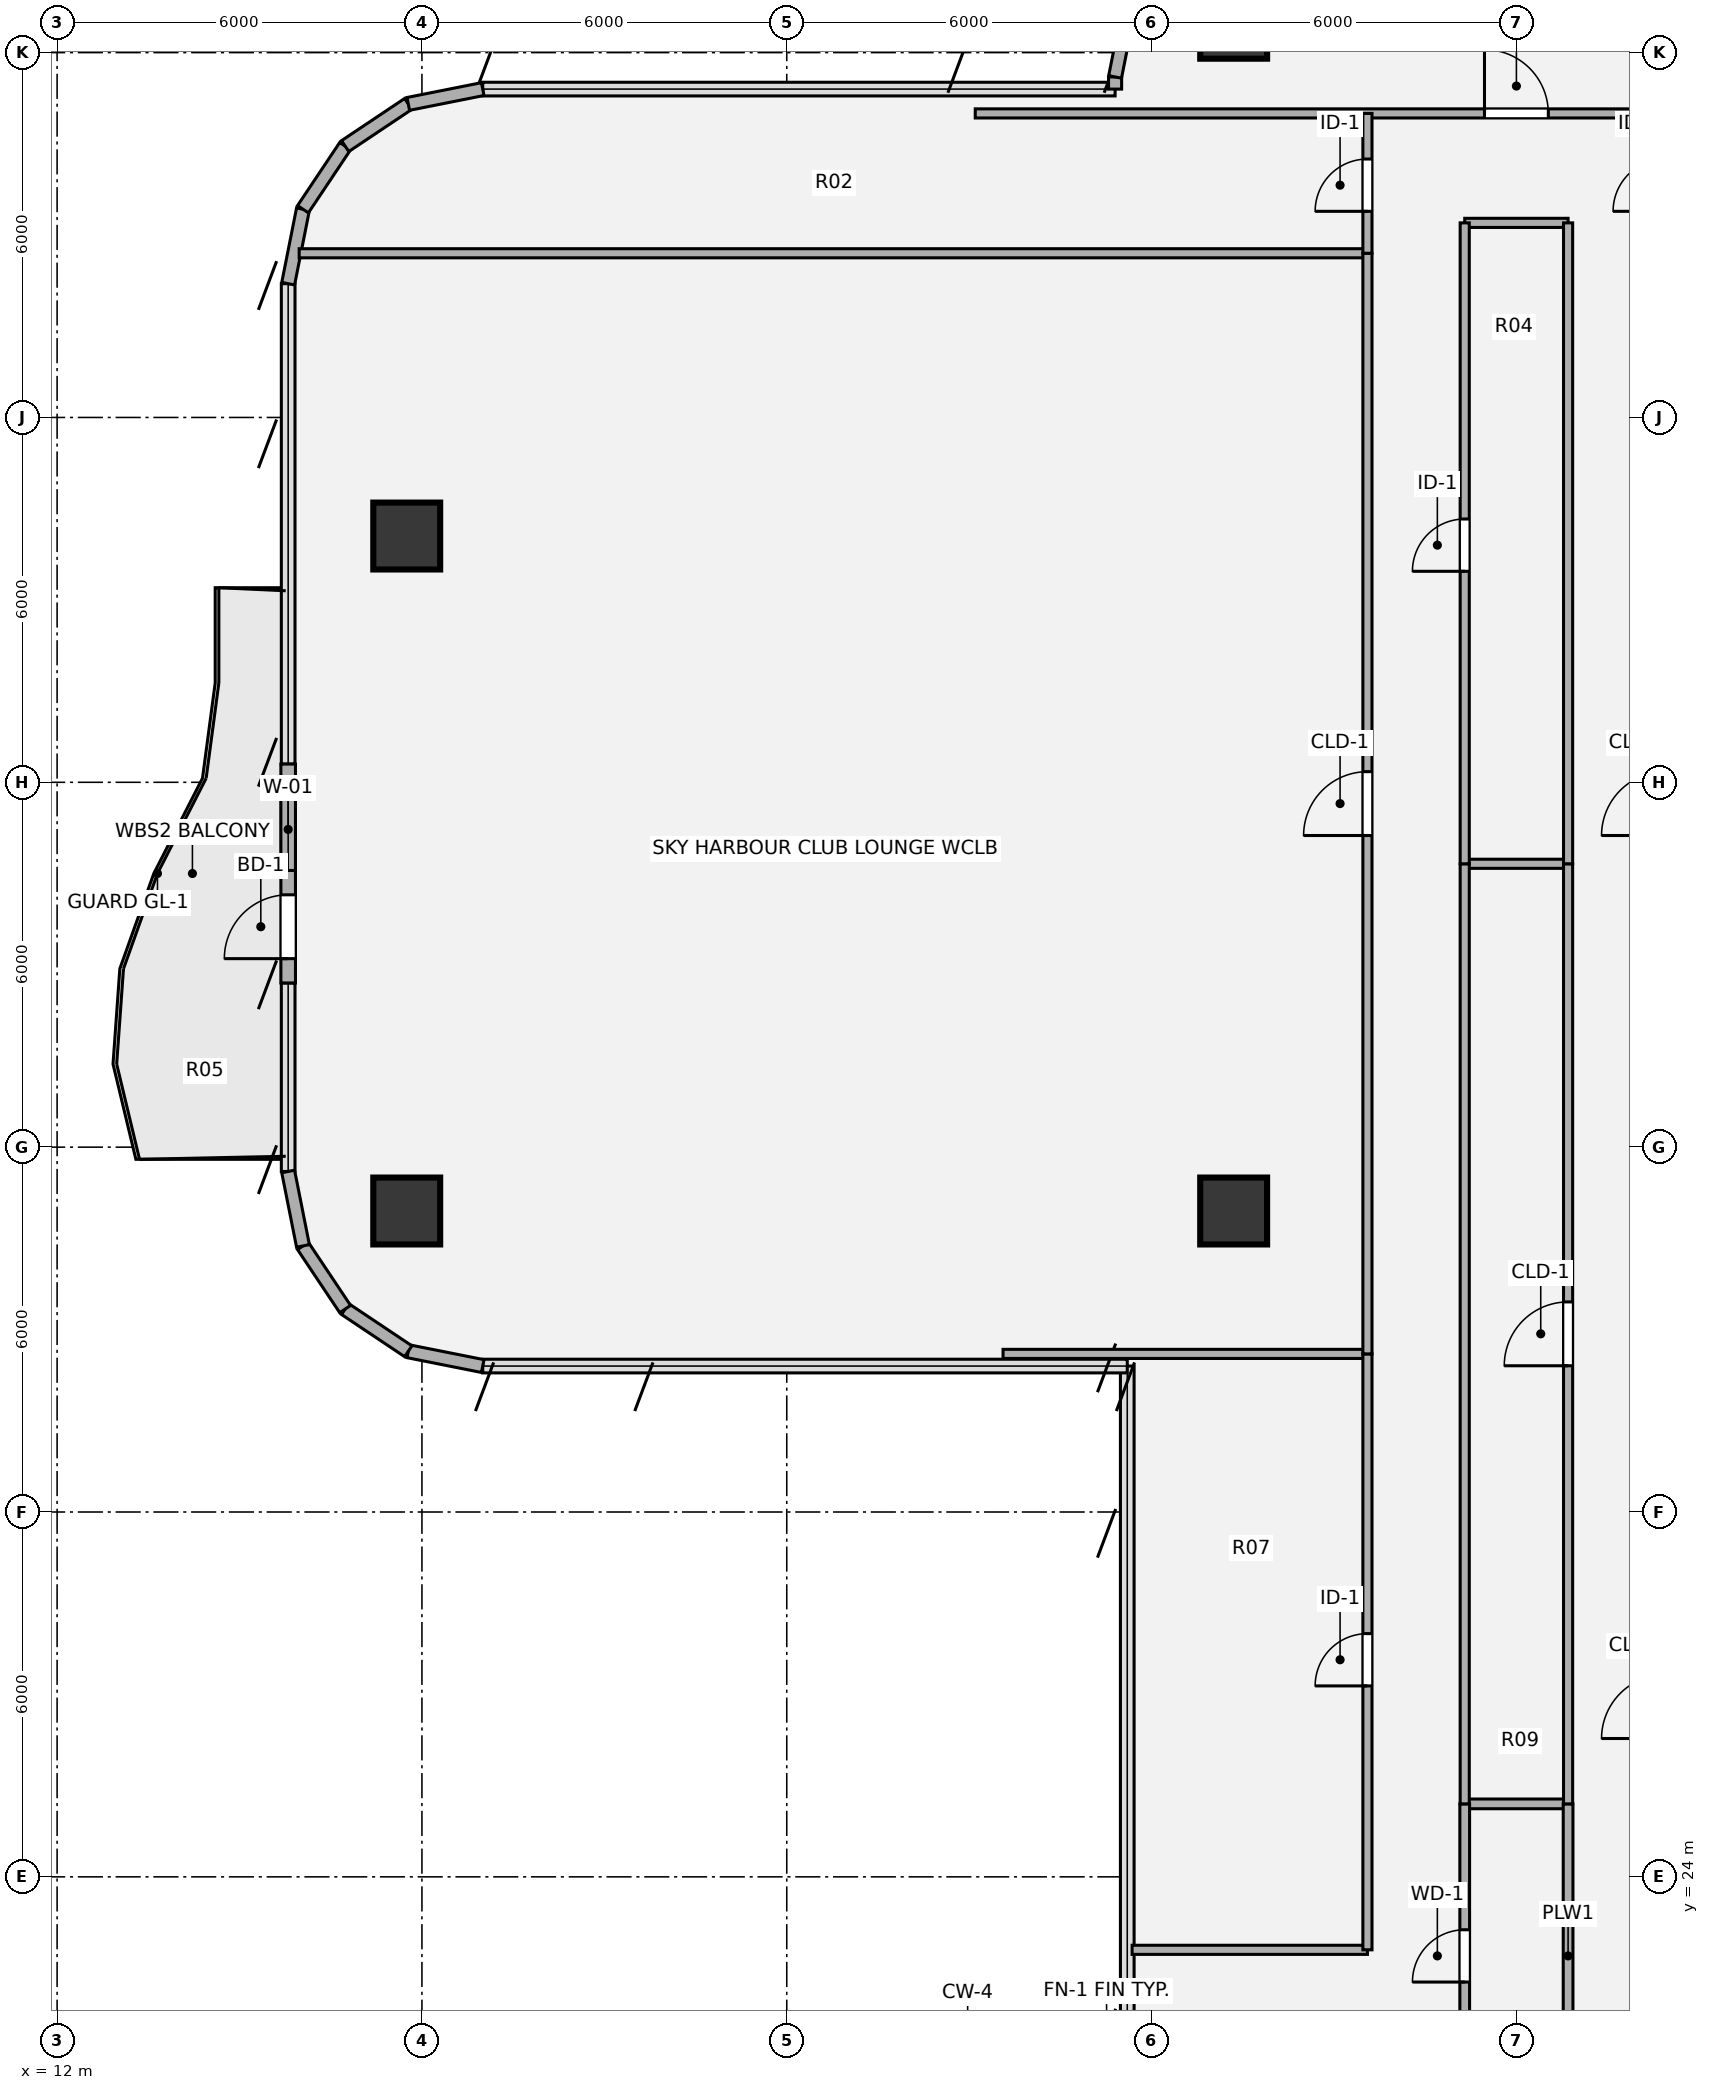
"""IFC4 building model, lengths in metres.
Left out: names, types, materials, properties, quantities, classifications, styles, units other than length and angle.
Written with IfcOpenShell. Run it as: python <this file> out.ifc"""

import sys

from ifc_helpers import new_model, si_unit, direction, frame, frame_2d, origin, origin_2d, place, context, subcontext, project, spatial, rectangle, hollow_circle, extrude, source, transform, mapped, element, fill, save


model = new_model("IFC4")
c1 = context("Model", 3, precision=1e-05, world=origin(), true_north=direction((0.0, 1.0)))
c2 = subcontext(c1, "Body", "Model", "MODEL_VIEW")
j1 = project(units=[si_unit("LENGTHUNIT", "METRE"), si_unit("PLANEANGLEUNIT", "RADIAN")], contexts=[c1])
p1 = place(None, origin())
s1 = spatial("IfcSite", under=j1, at=p1, CompositionType="ELEMENT")
p2 = place(p1, origin())
s2 = spatial("IfcBuilding", under=s1, at=p2, CompositionType="ELEMENT")
p3 = place(p2, frame((0.0, 0.0, 186.66)))
s3 = spatial("IfcBuildingStorey", under=s2, at=p3, CompositionType="ELEMENT", Elevation=186.66)
m1 = source(origin(), c2, "Body", "SweptSolid", [
    extrude(hollow_circle(Radius=0.55, WallThickness=0.04, at=origin_2d()), origin(), (0.0, 0.0, 1.0), 3.78),
])
for number, where, z_axis, x_axis in (
    (1, (17.75, 34.95, 0.0), (0.0, 0.0, 1.0), (1.0, 0.0, 0.0)),
    (2, (17.75, 46.05, 0.0), (0.0, 0.0, 1.0), (1.0, 0.0, 0.0)),
    (3, (31.35, 34.95, 0.0), (0.0, 0.0, 1.0), (1.0, 0.0, 0.0)),
    (4, (31.35, 54.45, 0.0), (0.0, 0.0, 1.0), (1.0, 0.0, 0.0)),
):
    element("IfcColumn", number, at=place(p3, frame(where, z_axis=z_axis, x_axis=x_axis)), inside=s3, PredefinedType="COLUMN", context=c2, shape_type="MappedRepresentation", body=[
        mapped(m1, transform((0.0, 0.0, 0.0), x_axis=(1.0, 0.0, 0.0), y_axis=(0.0, 1.0, 0.0), z_axis=(0.0, 0.0, 1.0), scale=1.0)),
    ])
for number, where, z_axis, x_axis in (
    (5, (19.0, 32.4, 0.0), (0.0, 0.0, 1.0), (-0.981, 0.195, 0.0)),
    (6, (17.775, 32.644, 0.0), (0.0, 0.0, 1.0), (-0.831, 0.556, 0.0)),
    (7, (16.737, 33.337, 0.0), (0.0, 0.0, 1.0), (-0.556, 0.831, 0.0)),
    (8, (16.044, 34.375, 0.0), (0.0, 0.0, 1.0), (-0.195, 0.981, 0.0)),
):
    element("IfcWall", number, at=place(p3, frame(where, z_axis=z_axis, x_axis=x_axis)), inside=s3, PredefinedType="SOLIDWALL", context=c2, shape_type="SweptSolid", body=[
        extrude(rectangle(XDim=1.249, YDim=0.215, at=frame_2d((0.624, 0.0))), origin(), (0.0, 0.0, 1.0), 3.53),
    ])
p4 = place(p3, frame((15.8, 38.7, 0.0), z_axis=(0.0, 0.0, 1.0), x_axis=(0.0, 1.0, 0.0)))
e9 = element("IfcWall", 9, at=p4, inside=s3, PredefinedType="SOLIDWALL", context=c2, shape_type="SweptSolid", body=[
    extrude(rectangle(XDim=3.6, YDim=0.24, at=frame_2d((1.8, 0.0))), origin(), (0.0, 0.0, 1.0), 3.53),
])
p5 = place(p4, frame((0.4, 0.0, 0.0)))
e10 = element("IfcOpeningElement", 10, at=p5, cuts=e9, PredefinedType="OPENING", context=c2, shape_type="SweptSolid", body=[
    extrude(rectangle(XDim=1.05, YDim=2.15, at=origin_2d()), frame((0.525, 0.13, 1.075), z_axis=(0.0, -1.0, 0.0), x_axis=(1.0, 0.0, 0.0)), (0.0, 0.0, 1.0), 0.26),
])
p6 = place(p4, frame((1.85, 0.0, 0.85)))
e11 = element("IfcOpeningElement", 11, at=p6, cuts=e9, PredefinedType="OPENING", context=c2, shape_type="SweptSolid", body=[
    extrude(rectangle(XDim=1.35, YDim=1.35, at=origin_2d()), frame((0.675, 0.13, 0.675), z_axis=(0.0, -1.0, 0.0), x_axis=(1.0, 0.0, 0.0)), (0.0, 0.0, 1.0), 0.26),
])
for number, where, z_axis, x_axis in (
    (12, (15.8, 50.2, 0.0), (0.0, 0.0, 1.0), (0.195, 0.981, 0.0)),
    (13, (16.044, 51.425, 0.0), (0.0, 0.0, 1.0), (0.556, 0.831, 0.0)),
    (14, (16.737, 52.463, 0.0), (0.0, 0.0, 1.0), (0.831, 0.556, 0.0)),
    (15, (17.775, 53.156, 0.0), (0.0, 0.0, 1.0), (0.981, 0.195, 0.0)),
):
    element("IfcWall", number, at=place(p3, frame(where, z_axis=z_axis, x_axis=x_axis)), inside=s3, PredefinedType="SOLIDWALL", context=c2, shape_type="SweptSolid", body=[
        extrude(rectangle(XDim=1.249, YDim=0.215, at=frame_2d((0.624, 0.0))), origin(), (0.0, 0.0, 1.0), 3.53),
    ])
p7 = place(p3, frame((29.4, 53.4, 0.0), z_axis=(0.0, 0.0, 1.0), x_axis=(0.0, 1.0, 0.0)))
e16 = element("IfcWall", 16, at=p7, inside=s3, PredefinedType="SOLIDWALL", context=c2, shape_type="SweptSolid", body=[
    extrude(rectangle(XDim=0.2, YDim=0.215, at=frame_2d((0.1, 0.0))), origin(), (0.0, 0.0, 1.0), 3.53),
])
p8 = place(p3, frame((29.4, 53.6, 0.0), z_axis=(0.0, 0.0, 1.0), x_axis=(0.195127417394, 0.980777900945, 0.0)))
e17 = element("IfcWall", 17, at=p8, inside=s3, PredefinedType="SOLIDWALL", context=c2, shape_type="SweptSolid", body=[
    extrude(rectangle(XDim=1.092, YDim=0.215, at=frame_2d((0.546, 0.0))), origin(), (0.0, 0.0, 1.0), 3.53),
])
p9 = place(p3, frame((29.68, 22.8, 0.0), z_axis=(0.0, 0.0, 1.0), x_axis=(1.0, 0.0, 0.0)))
e18 = element("IfcWall", 18, at=p9, inside=s3, PredefinedType="PARTITIONING", context=c2, shape_type="SweptSolid", body=[
    extrude(rectangle(XDim=3.87, YDim=0.15, at=frame_2d((1.935, 0.0))), origin(), (0.0, 0.0, 1.0), 3.5),
])
p10 = place(p3, frame((35.15, 25.2, 0.0), z_axis=(0.0, 0.0, 1.0), x_axis=(1.0, 0.0, 0.0)))
e19 = element("IfcWall", 19, at=p10, inside=s3, PredefinedType="PLUMBINGWALL", context=c2, shape_type="SweptSolid", body=[
    extrude(rectangle(XDim=1.7, YDim=0.16, at=frame_2d((0.85, 0.0))), origin(), (0.0, 0.0, 1.0), 3.5),
])
p11 = place(p3, frame((27.557, 32.6, 0.0), z_axis=(0.0, 0.0, 1.0), x_axis=(1.0, 0.0, 0.0)))
e20 = element("IfcWall", 20, at=p11, inside=s3, PredefinedType="PARTITIONING", context=c2, shape_type="SweptSolid", body=[
    extrude(rectangle(XDim=5.993, YDim=0.15, at=frame_2d((2.997, 0.0))), origin(), (0.0, 0.0, 1.0), 3.5),
])
p12 = place(p3, frame((35.15, 40.66, 0.0), z_axis=(0.0, 0.0, 1.0), x_axis=(1.0, 0.0, 0.0)))
e21 = element("IfcWall", 21, at=p12, inside=s3, PredefinedType="PARTITIONING", context=c2, shape_type="SweptSolid", body=[
    extrude(rectangle(XDim=1.7, YDim=0.15, at=frame_2d((0.85, 0.0))), origin(), (0.0, 0.0, 1.0), 3.259),
])
p13 = place(p3, frame((15.981, 50.7, 0.0), z_axis=(0.0, 0.0, 1.0), x_axis=(1.0, 0.0, 0.0)))
e22 = element("IfcWall", 22, at=p13, inside=s3, PredefinedType="PARTITIONING", context=c2, shape_type="SweptSolid", body=[
    extrude(rectangle(XDim=17.569, YDim=0.15, at=frame_2d((8.785, 0.0))), origin(), (0.0, 0.0, 1.0), 3.308),
])
p14 = place(p3, frame((35.15, 51.2, 0.0), z_axis=(0.0, 0.0, 1.0), x_axis=(1.0, 0.0, 0.0)))
e23 = element("IfcWall", 23, at=p14, inside=s3, PredefinedType="PARTITIONING", context=c2, shape_type="SweptSolid", body=[
    extrude(rectangle(XDim=1.7, YDim=0.15, at=frame_2d((0.85, 0.0))), origin(), (0.0, 0.0, 1.0), 3.308),
])
p15 = place(p3, frame((27.1, 53.0, 0.0), z_axis=(0.0, 0.0, 1.0), x_axis=(1.0, 0.0, 0.0)))
e24 = element("IfcWall", 24, at=p15, inside=s3, PredefinedType="PARTITIONING", context=c2, shape_type="SweptSolid", body=[
    extrude(rectangle(XDim=17.8, YDim=0.15, at=frame_2d((8.9, 0.0))), origin(), (0.0, 0.0, 1.0), 3.308),
])
p16 = place(p15, frame((8.375, 0.0, 0.0)))
e25 = element("IfcOpeningElement", 25, at=p16, cuts=e24, PredefinedType="OPENING", context=c2, shape_type="SweptSolid", body=[
    extrude(rectangle(XDim=1.05, YDim=2.1, at=origin_2d()), frame((0.525, 0.085, 1.05), z_axis=(0.0, -1.0, 0.0), x_axis=(1.0, 0.0, 0.0)), (0.0, 0.0, 1.0), 0.17),
])
p17 = place(p3, frame((33.55, 22.8, 0.0), z_axis=(0.0, 0.0, 1.0), x_axis=(0.0, 1.0, 0.0)))
e26 = element("IfcWall", 26, at=p17, inside=s3, PredefinedType="PARTITIONING", context=c2, shape_type="SweptSolid", body=[
    extrude(rectangle(XDim=9.8, YDim=0.15, at=frame_2d((4.9, 0.0))), origin(), (0.0, 0.0, 1.0), 3.5),
])
p18 = place(p17, frame((4.34, 0.0, 0.0)))
e27 = element("IfcOpeningElement", 27, at=p18, cuts=e26, PredefinedType="OPENING", context=c2, shape_type="SweptSolid", body=[
    extrude(rectangle(XDim=0.86, YDim=2.1, at=origin_2d()), frame((0.43, 0.085, 1.05), z_axis=(0.0, -1.0, 0.0), x_axis=(1.0, 0.0, 0.0)), (0.0, 0.0, 1.0), 0.17),
])
p19 = place(p3, frame((33.55, 32.6, 0.0), z_axis=(0.0, 0.0, 1.0), x_axis=(0.0, 1.0, 0.0)))
e28 = element("IfcWall", 28, at=p19, inside=s3, PredefinedType="PARTITIONING", context=c2, shape_type="SweptSolid", body=[
    extrude(rectangle(XDim=18.1, YDim=0.15, at=frame_2d((9.05, 0.0))), origin(), (0.0, 0.0, 1.0), 3.5),
])
p20 = place(p19, frame((8.525, 0.0, 0.0)))
e29 = element("IfcOpeningElement", 29, at=p20, cuts=e28, PredefinedType="OPENING", context=c2, shape_type="SweptSolid", body=[
    extrude(rectangle(XDim=1.05, YDim=2.1, at=origin_2d()), frame((0.525, 0.085, 1.05), z_axis=(0.0, -1.0, 0.0), x_axis=(1.0, 0.0, 0.0)), (0.0, 0.0, 1.0), 0.17),
])
p21 = place(p3, frame((33.55, 50.7, 0.0), z_axis=(0.0, 0.0, 1.0), x_axis=(0.0, 1.0, 0.0)))
e30 = element("IfcWall", 30, at=p21, inside=s3, PredefinedType="PARTITIONING", context=c2, shape_type="SweptSolid", body=[
    extrude(rectangle(XDim=2.3, YDim=0.15, at=frame_2d((1.15, 0.0))), origin(), (0.0, 0.0, 1.0), 3.5),
])
p22 = place(p21, frame((0.69, 0.0, 0.0)))
e31 = element("IfcOpeningElement", 31, at=p22, cuts=e30, PredefinedType="OPENING", context=c2, shape_type="SweptSolid", body=[
    extrude(rectangle(XDim=0.86, YDim=2.1, at=origin_2d()), frame((0.43, 0.085, 1.05), z_axis=(0.0, -1.0, 0.0), x_axis=(1.0, 0.0, 0.0)), (0.0, 0.0, 1.0), 0.17),
])
p23 = place(p3, frame((35.15, 20.2, 0.0), z_axis=(0.0, 0.0, 1.0), x_axis=(0.0, 1.0, 0.0)))
e32 = element("IfcWall", 32, at=p23, inside=s3, PredefinedType="PLUMBINGWALL", context=c2, shape_type="SweptSolid", body=[
    extrude(rectangle(XDim=5.0, YDim=0.16, at=frame_2d((2.5, 0.0))), origin(), (0.0, 0.0, 1.0), 3.5),
])
p24 = place(p23, frame((2.07, 0.0, 0.0)))
e33 = element("IfcOpeningElement", 33, at=p24, cuts=e32, PredefinedType="OPENING", context=c2, shape_type="SweptSolid", body=[
    extrude(rectangle(XDim=0.86, YDim=2.1, at=origin_2d()), frame((0.43, 0.09, 1.05), z_axis=(0.0, -1.0, 0.0), x_axis=(1.0, 0.0, 0.0)), (0.0, 0.0, 1.0), 0.18),
])
p25 = place(p3, frame((35.15, 25.2, 0.0), z_axis=(0.0, 0.0, 1.0), x_axis=(0.0, 1.0, 0.0)))
e34 = element("IfcWall", 34, at=p25, inside=s3, PredefinedType="PARTITIONING", context=c2, shape_type="SweptSolid", body=[
    extrude(rectangle(XDim=15.46, YDim=0.15, at=frame_2d((7.73, 0.0))), origin(), (0.0, 0.0, 1.0), 3.5),
])
p26 = place(p3, frame((35.15, 40.66, 0.0), z_axis=(0.0, 0.0, 1.0), x_axis=(0.0, 1.0, 0.0)))
e35 = element("IfcWall", 35, at=p26, inside=s3, PredefinedType="PARTITIONING", context=c2, shape_type="SweptSolid", body=[
    extrude(rectangle(XDim=10.54, YDim=0.15, at=frame_2d((5.27, 0.0))), origin(), (0.0, 0.0, 1.0), 3.5),
])
p27 = place(p26, frame((4.81, 0.0, 0.0)))
e36 = element("IfcOpeningElement", 36, at=p27, cuts=e35, PredefinedType="OPENING", context=c2, shape_type="SweptSolid", body=[
    extrude(rectangle(XDim=0.86, YDim=2.1, at=origin_2d()), frame((0.43, 0.085, 1.05), z_axis=(0.0, -1.0, 0.0), x_axis=(1.0, 0.0, 0.0)), (0.0, 0.0, 1.0), 0.17),
])
p28 = place(p3, frame((36.85, 20.2, 0.0), z_axis=(0.0, 0.0, 1.0), x_axis=(0.0, 1.0, 0.0)))
e37 = element("IfcWall", 37, at=p28, inside=s3, PredefinedType="PLUMBINGWALL", context=c2, shape_type="SweptSolid", body=[
    extrude(rectangle(XDim=5.0, YDim=0.16, at=frame_2d((2.5, 0.0))), origin(), (0.0, 0.0, 1.0), 3.5),
])
p29 = place(p3, frame((36.85, 25.2, 0.0), z_axis=(0.0, 0.0, 1.0), x_axis=(0.0, 1.0, 0.0)))
e38 = element("IfcWall", 38, at=p29, inside=s3, PredefinedType="PARTITIONING", context=c2, shape_type="SweptSolid", body=[
    extrude(rectangle(XDim=15.46, YDim=0.15, at=frame_2d((7.73, 0.0))), origin(), (0.0, 0.0, 1.0), 3.5),
])
p30 = place(p29, frame((7.205, 0.0, 0.0)))
e39 = element("IfcOpeningElement", 39, at=p30, cuts=e38, PredefinedType="OPENING", context=c2, shape_type="SweptSolid", body=[
    extrude(rectangle(XDim=1.05, YDim=2.1, at=origin_2d()), frame((0.525, 0.085, 1.05), z_axis=(0.0, -1.0, 0.0), x_axis=(1.0, 0.0, 0.0)), (0.0, 0.0, 1.0), 0.17),
])
p31 = place(p3, frame((36.85, 40.66, 0.0), z_axis=(0.0, 0.0, 1.0), x_axis=(0.0, 1.0, 0.0)))
e40 = element("IfcWall", 40, at=p31, inside=s3, PredefinedType="PARTITIONING", context=c2, shape_type="SweptSolid", body=[
    extrude(rectangle(XDim=10.54, YDim=0.15, at=frame_2d((5.27, 0.0))), origin(), (0.0, 0.0, 1.0), 3.5),
])
m2 = source(origin(), c2, "Body", "SweptSolid", [
    extrude(rectangle(XDim=1.05, YDim=2.15, at=origin_2d()), frame((0.525, 0.025, 1.075), z_axis=(0.0, -1.0, 0.0), x_axis=(1.0, 0.0, 0.0)), (0.0, 0.0, 1.0), 0.05),
])
p32 = place(p5, origin())
e41 = element("IfcDoor", 41, at=p32, inside=s3, OperationType="SINGLE_SWING_LEFT", PredefinedType="DOOR", context=c2, shape_type="MappedRepresentation", body=[
    mapped(m2, transform((0.0, 0.0, 0.0), x_axis=(1.0, 0.0, 0.0), y_axis=(0.0, 1.0, 0.0), z_axis=(0.0, 0.0, 1.0), scale=1.0)),
])
fill(e10, e41)
m3 = source(origin(), c2, "Body", "SweptSolid", [
    extrude(rectangle(XDim=1.35, YDim=1.35, at=origin_2d()), frame((0.675, 0.03, 0.675), z_axis=(0.0, -1.0, 0.0), x_axis=(1.0, 0.0, 0.0)), (0.0, 0.0, 1.0), 0.06),
])
p33 = place(p6, origin())
e42 = element("IfcWindow", 42, at=p33, inside=s3, PartitioningType="SINGLE_PANEL", PredefinedType="WINDOW", context=c2, shape_type="MappedRepresentation", body=[
    mapped(m3, transform((0.0, 0.0, 0.0), x_axis=(1.0, 0.0, 0.0), y_axis=(0.0, 1.0, 0.0), z_axis=(0.0, 0.0, 1.0), scale=1.0)),
])
fill(e11, e42)
m4 = source(origin(), c2, "Body", "SweptSolid", [
    extrude(rectangle(XDim=1.05, YDim=2.1, at=origin_2d()), frame((0.525, 0.025, 1.05), z_axis=(0.0, -1.0, 0.0), x_axis=(1.0, 0.0, 0.0)), (0.0, 0.0, 1.0), 0.05),
])
p34 = place(p16, origin())
e43 = element("IfcDoor", 43, at=p34, inside=s3, OperationType="SINGLE_SWING_LEFT", PredefinedType="DOOR", context=c2, shape_type="MappedRepresentation", body=[
    mapped(m4, transform((0.0, 0.0, 0.0), x_axis=(1.0, 0.0, 0.0), y_axis=(0.0, 1.0, 0.0), z_axis=(0.0, 0.0, 1.0), scale=1.0)),
])
fill(e25, e43)
m5 = source(origin(), c2, "Body", "SweptSolid", [
    extrude(rectangle(XDim=0.86, YDim=2.1, at=origin_2d()), frame((0.43, 0.025, 1.05), z_axis=(0.0, -1.0, 0.0), x_axis=(1.0, 0.0, 0.0)), (0.0, 0.0, 1.0), 0.05),
])
p35 = place(p18, origin())
e44 = element("IfcDoor", 44, at=p35, inside=s3, OperationType="SINGLE_SWING_LEFT", PredefinedType="DOOR", context=c2, shape_type="MappedRepresentation", body=[
    mapped(m5, transform((0.0, 0.0, 0.0), x_axis=(1.0, 0.0, 0.0), y_axis=(0.0, 1.0, 0.0), z_axis=(0.0, 0.0, 1.0), scale=1.0)),
])
fill(e27, e44)
p36 = place(p20, origin())
e45 = element("IfcDoor", 45, at=p36, inside=s3, OperationType="SINGLE_SWING_LEFT", PredefinedType="DOOR", context=c2, shape_type="MappedRepresentation", body=[
    mapped(m4, transform((0.0, 0.0, 0.0), x_axis=(1.0, 0.0, 0.0), y_axis=(0.0, 1.0, 0.0), z_axis=(0.0, 0.0, 1.0), scale=1.0)),
])
fill(e29, e45)
p37 = place(p22, origin())
e46 = element("IfcDoor", 46, at=p37, inside=s3, OperationType="SINGLE_SWING_LEFT", PredefinedType="DOOR", context=c2, shape_type="MappedRepresentation", body=[
    mapped(m5, transform((0.0, 0.0, 0.0), x_axis=(1.0, 0.0, 0.0), y_axis=(0.0, 1.0, 0.0), z_axis=(0.0, 0.0, 1.0), scale=1.0)),
])
fill(e31, e46)
m6 = source(origin(), c2, "Body", "SweptSolid", [
    extrude(rectangle(XDim=0.86, YDim=2.1, at=origin_2d()), frame((0.43, 0.025, 1.05), z_axis=(0.0, -1.0, 0.0), x_axis=(1.0, 0.0, 0.0)), (0.0, 0.0, 1.0), 0.05),
])
p38 = place(p24, origin())
e47 = element("IfcDoor", 47, at=p38, inside=s3, OperationType="SINGLE_SWING_LEFT", PredefinedType="DOOR", context=c2, shape_type="MappedRepresentation", body=[
    mapped(m6, transform((0.0, 0.0, 0.0), x_axis=(1.0, 0.0, 0.0), y_axis=(0.0, 1.0, 0.0), z_axis=(0.0, 0.0, 1.0), scale=1.0)),
])
fill(e33, e47)
p39 = place(p27, origin())
e48 = element("IfcDoor", 48, at=p39, inside=s3, OperationType="SINGLE_SWING_LEFT", PredefinedType="DOOR", context=c2, shape_type="MappedRepresentation", body=[
    mapped(m5, transform((0.0, 0.0, 0.0), x_axis=(1.0, 0.0, 0.0), y_axis=(0.0, 1.0, 0.0), z_axis=(0.0, 0.0, 1.0), scale=1.0)),
])
fill(e36, e48)
p40 = place(p30, origin())
e49 = element("IfcDoor", 49, at=p40, inside=s3, OperationType="SINGLE_SWING_LEFT", PredefinedType="DOOR", context=c2, shape_type="MappedRepresentation", body=[
    mapped(m4, transform((0.0, 0.0, 0.0), x_axis=(1.0, 0.0, 0.0), y_axis=(0.0, 1.0, 0.0), z_axis=(0.0, 0.0, 1.0), scale=1.0)),
])
fill(e39, e49)
save(model, sys.argv[1])
